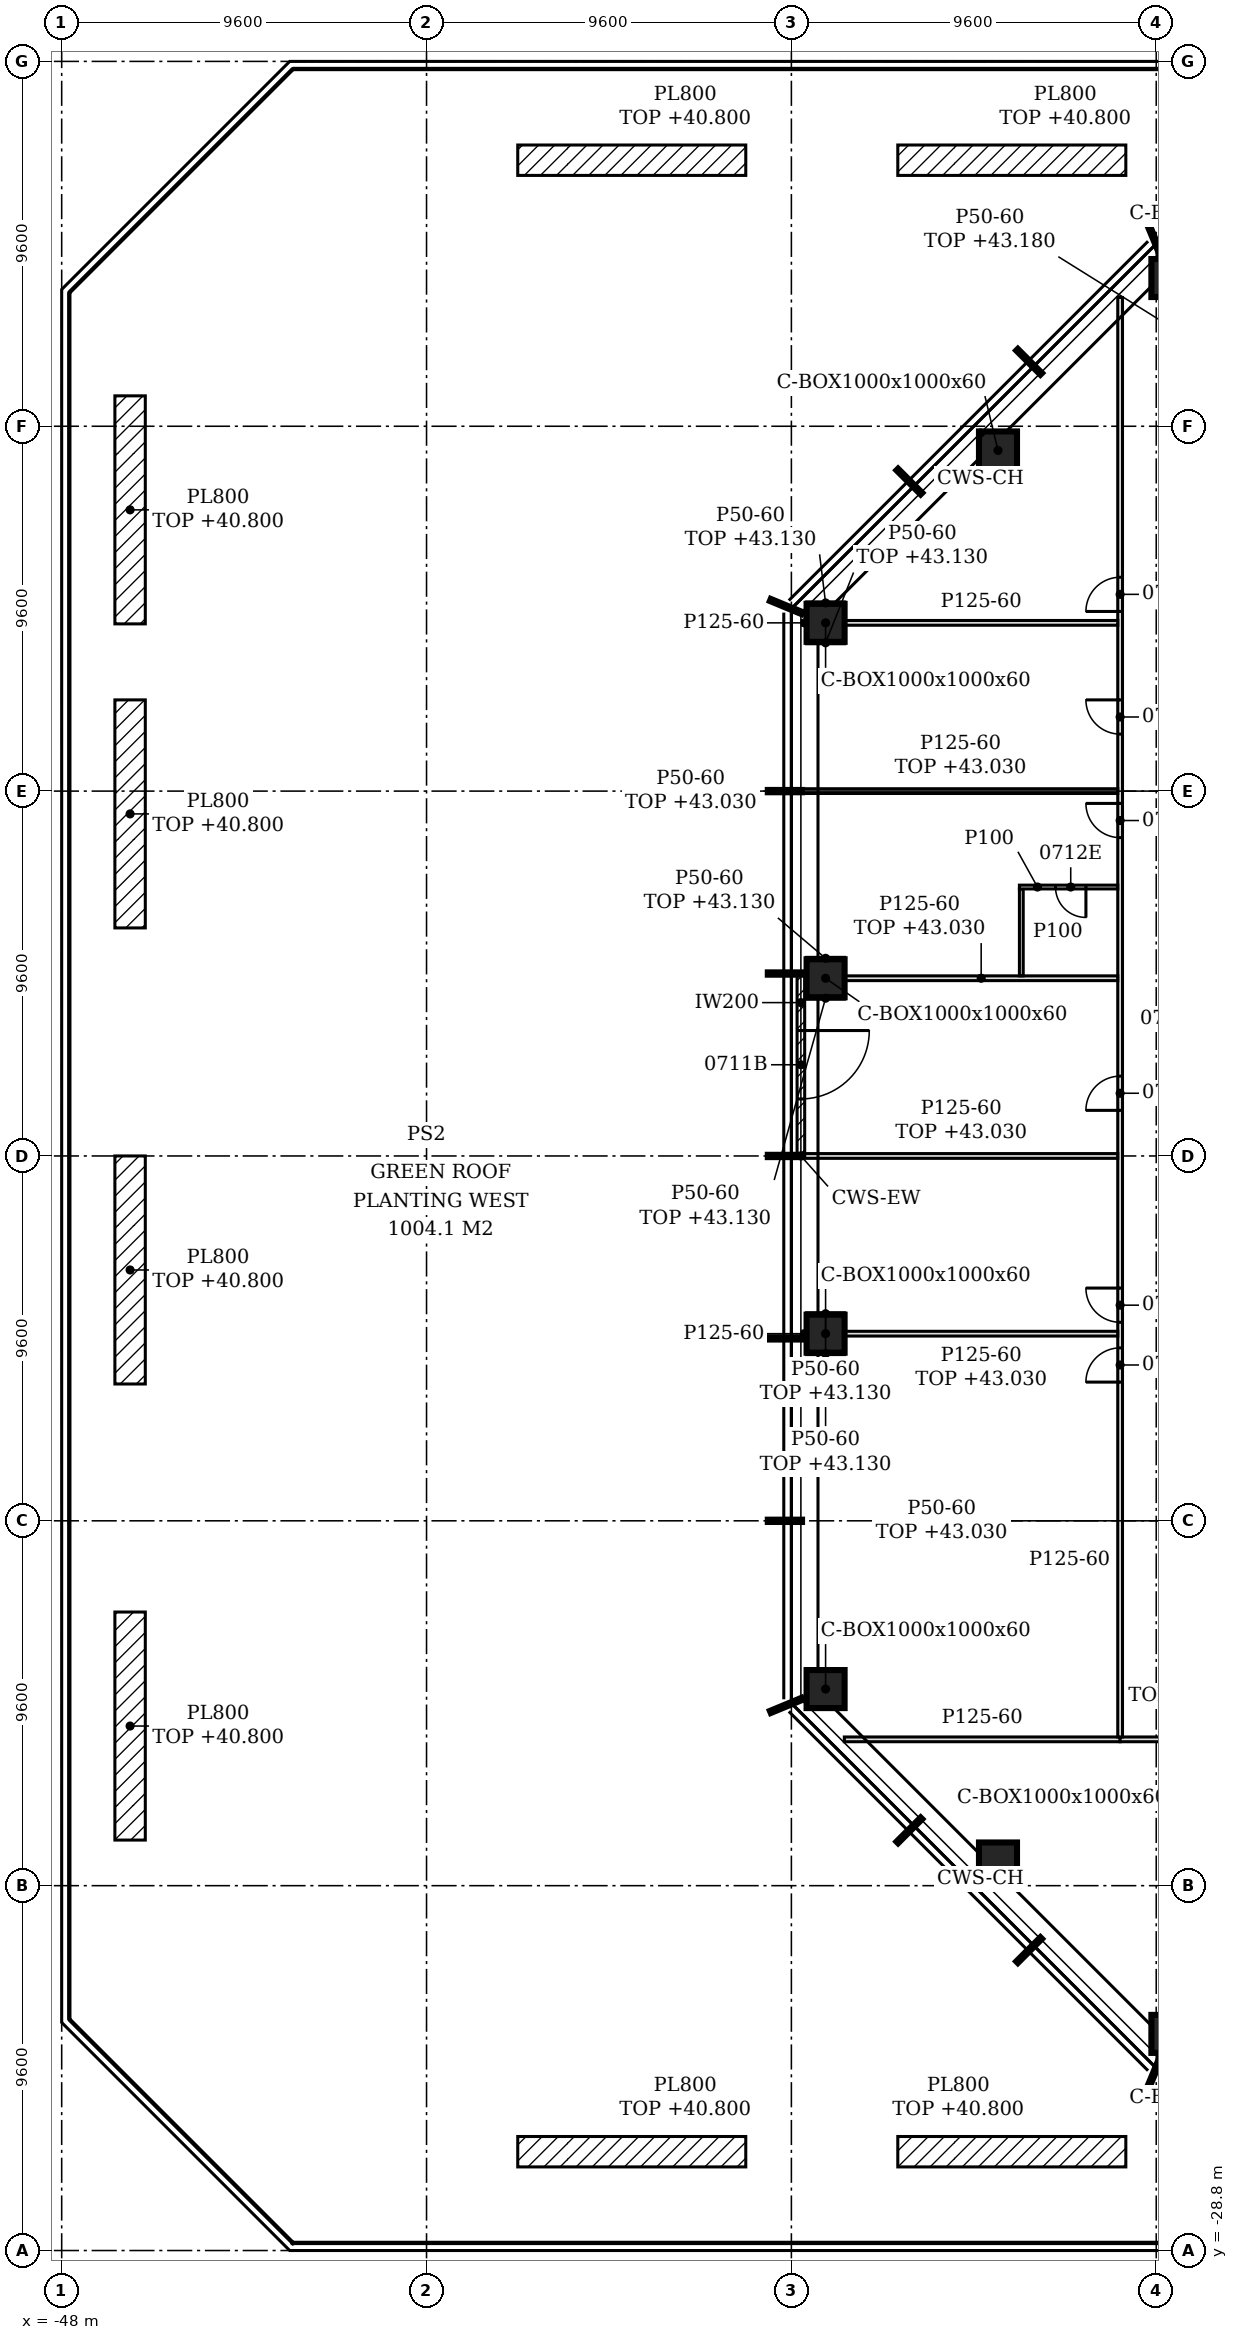
"""IFC4 building model, lengths in metres.
Left out: names, types, materials, properties, quantities, classifications, styles, units other than length and angle.
Written with IfcOpenShell. Run it as: python <this file> out.ifc"""

import sys

from ifc_helpers import new_model, si_unit, direction, frame, frame_2d, origin, origin_2d, place, context, subcontext, project, spatial, polyline, rectangle, hollow_rectangle, outline, extrude, element, fill, save


model = new_model("IFC4")
c1 = context("Model", 3, precision=1e-05, world=origin(), true_north=direction((0.0, 1.0)))
c2 = subcontext(c1, "Body", "Model", "MODEL_VIEW")
j1 = project(units=[si_unit("LENGTHUNIT", "METRE"), si_unit("PLANEANGLEUNIT", "RADIAN")], contexts=[c1])
p1 = place(None, origin())
s1 = spatial("IfcSite", under=j1, at=p1, CompositionType="ELEMENT")
p2 = place(p1, origin())
s2 = spatial("IfcBuilding", under=s1, at=p2, CompositionType="ELEMENT")
p3 = place(p2, frame((0.0, 0.0, 40.2)))
s3 = spatial("IfcBuildingStorey", under=s2, at=p3, CompositionType="ELEMENT", Elevation=40.2)
for number, where, z_axis, x_axis in (
    (1, (-18.827, -23.1, -0.15), (0.0, 0.0, 1.0), (1.0, 0.0, 0.0)),
    (2, (-18.827, 23.1, -0.15), (0.0, 0.0, 1.0), (1.0, 0.0, 0.0)),
    (3, (-23.364, 18.564, -0.15), (0.0, 0.0, 1.0), (1.0, 0.0, 0.0)),
    (4, (-27.9, 14.027, -0.15), (0.0, 0.0, 1.0), (1.0, 0.0, 0.0)),
    (5, (-27.9, 4.676, -0.15), (0.0, 0.0, 1.0), (1.0, 0.0, 0.0)),
    (6, (-27.9, -4.676, -0.15), (0.0, 0.0, 1.0), (1.0, 0.0, 0.0)),
    (7, (-27.9, -14.027, -0.15), (0.0, 0.0, 1.0), (1.0, 0.0, 0.0)),
    (8, (-23.364, -18.564, -0.15), (0.0, 0.0, 1.0), (1.0, 0.0, 0.0)),
):
    element("IfcColumn", number, at=place(p3, frame(where, z_axis=z_axis, x_axis=x_axis)), inside=s3, PredefinedType="COLUMN", context=c2, shape_type="SweptSolid", body=[
        extrude(hollow_rectangle(XDim=1.0, YDim=1.0, WallThickness=0.06, at=origin_2d()), origin(), (0.0, 0.0, 1.0), 3.6),
    ])
for number, where, z_axis, x_axis in (
    (9, (-36.0, 26.2, 0.0), (0.0, 0.0, 1.0), (1.0, 0.0, 0.0)),
    (10, (-36.0, -26.2, 0.0), (0.0, 0.0, 1.0), (1.0, 0.0, 0.0)),
    (11, (-26.0, 26.2, 0.0), (0.0, 0.0, 1.0), (1.0, 0.0, 0.0)),
    (12, (-26.0, -26.2, 0.0), (0.0, 0.0, 1.0), (1.0, 0.0, 0.0)),
    (13, (-46.2, -18.0, 0.0), (0.0, 0.0, 1.0), (0.0, 1.0, 0.0)),
    (14, (-46.2, -6.0, 0.0), (0.0, 0.0, 1.0), (0.0, 1.0, 0.0)),
    (15, (-46.2, 6.0, 0.0), (0.0, 0.0, 1.0), (0.0, 1.0, 0.0)),
    (16, (-46.2, 14.0, 0.0), (0.0, 0.0, 1.0), (0.0, 1.0, 0.0)),
):
    element("IfcWall", number, at=place(p3, frame(where, z_axis=z_axis, x_axis=x_axis)), inside=s3, PredefinedType="NOTDEFINED", context=c2, shape_type="SweptSolid", body=[
        extrude(rectangle(XDim=6.0, YDim=0.8, at=frame_2d((3.0, 0.0))), origin(), (0.0, 0.0, 1.0), 0.6),
    ])
p4 = place(p3, frame((-28.55, 4.77, 0.0), z_axis=(0.0, 0.0, 1.0), x_axis=(0.0, -1.0, 0.0)))
e17 = element("IfcWall", 17, at=p4, inside=s3, PredefinedType="NOTDEFINED", context=c2, shape_type="SweptSolid", body=[
    extrude(rectangle(XDim=4.74, YDim=0.2, at=frame_2d((2.37, 0.0))), origin(), (0.0, 0.0, 1.0), 3.45),
])
p5 = place(p4, frame((1.47, 0.0, 0.0)))
e18 = element("IfcOpeningElement", 18, at=p5, cuts=e17, PredefinedType="OPENING", context=c2, shape_type="SweptSolid", body=[
    extrude(rectangle(XDim=1.8, YDim=2.4, at=frame_2d((0.9, 1.2))), frame((0.0, 0.11, 0.0), z_axis=(0.0, -1.0, 0.0), x_axis=(1.0, 0.0, 0.0)), (0.0, 0.0, 1.0), 0.22),
])
p6 = place(p3, frame((-27.407, -15.35, 0.0), z_axis=(0.0, 0.0, 1.0), x_axis=(1.0, 0.0, 0.0)))
e19 = element("IfcWall", 19, at=p6, inside=s3, PredefinedType="PARTITIONING", context=c2, shape_type="SweptSolid", body=[
    extrude(outline(polyline([(0.0, 0.0), (7.257, 0.0), (7.257, 3.45), (1.104, 3.45), (1.102, 2.93), (0.555, 2.93), (0.553, 3.45), (0.0, 3.45), (0.0, 0.0)])), frame((0.0, 0.062, 0.0), z_axis=(0.0, -1.0, 0.0), x_axis=(1.0, 0.0, 0.0)), (0.0, 0.0, 1.0), 0.125),
])
p7 = place(p3, frame((-20.15, -15.35, 0.0), z_axis=(0.0, 0.0, 1.0), x_axis=(1.0, 0.0, 0.0)))
e20 = element("IfcWall", 20, at=p7, inside=s3, PredefinedType="PARTITIONING", context=c2, shape_type="SweptSolid", body=[
    extrude(outline(polyline([(0.0, 0.0), (39.287, 0.0), (39.288, 2.73), (39.2, 2.73), (39.198, 3.45), (27.5, 3.45), (27.498, 2.73), (27.2, 2.73), (27.198, 3.45), (15.5, 3.45), (15.498, 2.73), (15.2, 2.73), (15.198, 3.45), (5.9, 3.45), (5.898, 2.93), (5.6, 2.93), (5.598, 3.45), (0.0, 3.45), (0.0, 0.0)])), frame((0.0, 0.062, 0.0), z_axis=(0.0, -1.0, 0.0), x_axis=(1.0, 0.0, 0.0)), (0.0, 0.0, 1.0), 0.125),
])
p8 = place(p7, frame((4.55, 0.0, 0.0)))
e21 = element("IfcOpeningElement", 21, at=p8, cuts=e20, PredefinedType="OPENING", context=c2, shape_type="SweptSolid", body=[
    extrude(rectangle(XDim=0.9, YDim=2.1, at=frame_2d((0.45, 1.05))), frame((0.0, 0.073, 0.0), z_axis=(0.0, -1.0, 0.0), x_axis=(1.0, 0.0, 0.0)), (0.0, 0.0, 1.0), 0.145),
])
p9 = place(p7, frame((7.136, 0.0, 0.0)))
e22 = element("IfcOpeningElement", 22, at=p9, cuts=e20, PredefinedType="OPENING", context=c2, shape_type="SweptSolid", body=[
    extrude(rectangle(XDim=0.9, YDim=2.1, at=frame_2d((0.45, 1.05))), frame((0.0, 0.073, 0.0), z_axis=(0.0, -1.0, 0.0), x_axis=(1.0, 0.0, 0.0)), (0.0, 0.0, 1.0), 0.145),
])
p10 = place(p7, frame((14.15, 0.0, 0.0)))
e23 = element("IfcOpeningElement", 23, at=p10, cuts=e20, PredefinedType="OPENING", context=c2, shape_type="SweptSolid", body=[
    extrude(rectangle(XDim=0.9, YDim=2.1, at=frame_2d((0.45, 1.05))), frame((0.0, 0.073, 0.0), z_axis=(0.0, -1.0, 0.0), x_axis=(1.0, 0.0, 0.0)), (0.0, 0.0, 1.0), 0.145),
])
p11 = place(p7, frame((16.55, 0.0, 0.0)))
e24 = element("IfcOpeningElement", 24, at=p11, cuts=e20, PredefinedType="OPENING", context=c2, shape_type="SweptSolid", body=[
    extrude(rectangle(XDim=0.9, YDim=2.1, at=frame_2d((0.45, 1.05))), frame((0.0, 0.073, 0.0), z_axis=(0.0, -1.0, 0.0), x_axis=(1.0, 0.0, 0.0)), (0.0, 0.0, 1.0), 0.145),
])
p12 = place(p7, frame((21.35, 0.0, 0.0)))
e25 = element("IfcOpeningElement", 25, at=p12, cuts=e20, PredefinedType="OPENING", context=c2, shape_type="SweptSolid", body=[
    extrude(rectangle(XDim=0.9, YDim=2.1, at=frame_2d((0.45, 1.05))), frame((0.0, 0.073, 0.0), z_axis=(0.0, -1.0, 0.0), x_axis=(1.0, 0.0, 0.0)), (0.0, 0.0, 1.0), 0.145),
])
p13 = place(p7, frame((28.364, 0.0, 0.0)))
e26 = element("IfcOpeningElement", 26, at=p13, cuts=e20, PredefinedType="OPENING", context=c2, shape_type="SweptSolid", body=[
    extrude(rectangle(XDim=0.9, YDim=2.1, at=frame_2d((0.45, 1.05))), frame((0.0, 0.073, 0.0), z_axis=(0.0, -1.0, 0.0), x_axis=(1.0, 0.0, 0.0)), (0.0, 0.0, 1.0), 0.145),
])
p14 = place(p7, frame((32.35, 0.0, 0.0)))
e27 = element("IfcOpeningElement", 27, at=p14, cuts=e20, PredefinedType="OPENING", context=c2, shape_type="SweptSolid", body=[
    extrude(rectangle(XDim=0.9, YDim=2.1, at=frame_2d((0.45, 1.05))), frame((0.0, 0.073, 0.0), z_axis=(0.0, -1.0, 0.0), x_axis=(1.0, 0.0, 0.0)), (0.0, 0.0, 1.0), 0.145),
])
p15 = place(p7, frame((37.35, 0.0, 0.0)))
e28 = element("IfcOpeningElement", 28, at=p15, cuts=e20, PredefinedType="OPENING", context=c2, shape_type="SweptSolid", body=[
    extrude(rectangle(XDim=0.9, YDim=2.1, at=frame_2d((0.45, 1.05))), frame((0.0, 0.073, 0.0), z_axis=(0.0, -1.0, 0.0), x_axis=(1.0, 0.0, 0.0)), (0.0, 0.0, 1.0), 0.145),
])
p16 = place(p3, frame((-20.15, -15.288, 0.0), z_axis=(0.0, 0.0, 1.0), x_axis=(0.0, 1.0, 0.0)))
e29 = element("IfcWall", 29, at=p16, inside=s3, PredefinedType="PARTITIONING", context=c2, shape_type="SweptSolid", body=[
    extrude(outline(polyline([(0.0, 0.0), (37.876, 0.0), (37.876, 3.45), (37.622, 3.45), (37.62, 2.63), (36.507, 2.63), (36.505, 3.45), (34.583, 3.45), (34.581, 2.98), (34.393, 2.98), (34.39, 3.45), (29.798, 3.45), (29.795, 2.83), (29.577, 2.83), (29.575, 3.45), (24.998, 3.45), (24.996, 2.83), (24.778, 2.83), (24.775, 3.45), (20.198, 3.45), (20.196, 2.83), (19.978, 2.83), (19.976, 3.45), (15.397, 3.45), (15.396, 2.83), (15.177, 2.83), (15.176, 3.45), (10.597, 3.45), (10.595, 2.83), (10.377, 2.83), (10.375, 3.45), (5.798, 3.45), (5.795, 2.83), (5.577, 2.83), (5.575, 3.45), (0.998, 3.45), (0.996, 2.83), (0.778, 2.83), (0.775, 3.45), (0.0, 3.45), (0.0, 0.0)])), frame((0.0, 0.062, 0.0), z_axis=(0.0, -1.0, 0.0), x_axis=(1.0, 0.0, 0.0)), (0.0, 0.0, 1.0), 0.125),
])
p17 = place(p16, frame((9.337, 0.0, 0.0)))
e30 = element("IfcOpeningElement", 30, at=p17, cuts=e29, PredefinedType="OPENING", context=c2, shape_type="SweptSolid", body=[
    extrude(rectangle(XDim=0.9, YDim=2.1, at=frame_2d((0.45, 1.05))), frame((0.0, 0.073, 0.0), z_axis=(0.0, -1.0, 0.0), x_axis=(1.0, 0.0, 0.0)), (0.0, 0.0, 1.0), 0.145),
])
p18 = place(p16, frame((10.912, 0.0, 0.0)))
e31 = element("IfcOpeningElement", 31, at=p18, cuts=e29, PredefinedType="OPENING", context=c2, shape_type="SweptSolid", body=[
    extrude(rectangle(XDim=0.9, YDim=2.1, at=frame_2d((0.45, 1.05))), frame((0.0, 0.073, 0.0), z_axis=(0.0, -1.0, 0.0), x_axis=(1.0, 0.0, 0.0)), (0.0, 0.0, 1.0), 0.145),
])
p19 = place(p16, frame((16.488, 0.0, 0.0)))
e32 = element("IfcOpeningElement", 32, at=p19, cuts=e29, PredefinedType="OPENING", context=c2, shape_type="SweptSolid", body=[
    extrude(rectangle(XDim=0.9, YDim=2.1, at=frame_2d((0.45, 1.05))), frame((0.0, 0.073, 0.0), z_axis=(0.0, -1.0, 0.0), x_axis=(1.0, 0.0, 0.0)), (0.0, 0.0, 1.0), 0.145),
])
p20 = place(p16, frame((23.664, 0.0, 0.0)))
e33 = element("IfcOpeningElement", 33, at=p20, cuts=e29, PredefinedType="OPENING", context=c2, shape_type="SweptSolid", body=[
    extrude(rectangle(XDim=0.9, YDim=2.1, at=frame_2d((0.45, 1.05))), frame((0.0, 0.073, 0.0), z_axis=(0.0, -1.0, 0.0), x_axis=(1.0, 0.0, 0.0)), (0.0, 0.0, 1.0), 0.145),
])
p21 = place(p16, frame((26.387, 0.0, 0.0)))
e34 = element("IfcOpeningElement", 34, at=p21, cuts=e29, PredefinedType="OPENING", context=c2, shape_type="SweptSolid", body=[
    extrude(rectangle(XDim=0.9, YDim=2.1, at=frame_2d((0.45, 1.05))), frame((0.0, 0.073, 0.0), z_axis=(0.0, -1.0, 0.0), x_axis=(1.0, 0.0, 0.0)), (0.0, 0.0, 1.0), 0.145),
])
p22 = place(p16, frame((29.615, 0.0, 0.0)))
e35 = element("IfcOpeningElement", 35, at=p22, cuts=e29, PredefinedType="OPENING", context=c2, shape_type="SweptSolid", body=[
    extrude(rectangle(XDim=0.9, YDim=2.1, at=frame_2d((0.45, 1.05))), frame((0.0, 0.073, 0.0), z_axis=(0.0, -1.0, 0.0), x_axis=(1.0, 0.0, 0.0)), (0.0, 0.0, 1.0), 0.145),
])
p23 = place(p3, frame((-28.503, -4.676, 0.0), z_axis=(0.0, 0.0, 1.0), x_axis=(1.0, 0.0, 0.0)))
e36 = element("IfcWall", 36, at=p23, inside=s3, PredefinedType="PARTITIONING", context=c2, shape_type="SweptSolid", body=[
    extrude(rectangle(XDim=0.103, YDim=0.125, at=frame_2d((0.052, 0.0))), origin(), (0.0, 0.0, 1.0), 3.45),
])
p24 = place(p3, frame((-27.4, -4.676, 0.0), z_axis=(0.0, 0.0, 1.0), x_axis=(1.0, 0.0, 0.0)))
e37 = element("IfcWall", 37, at=p24, inside=s3, PredefinedType="PARTITIONING", context=c2, shape_type="SweptSolid", body=[
    extrude(rectangle(XDim=7.188, YDim=0.125, at=frame_2d((3.594, 0.0))), origin(), (0.0, 0.0, 1.0), 2.83),
])
p25 = place(p3, frame((-28.45, 0.0, 0.0), z_axis=(0.0, 0.0, 1.0), x_axis=(1.0, 0.0, 0.0)))
e38 = element("IfcWall", 38, at=p25, inside=s3, PredefinedType="PARTITIONING", context=c2, shape_type="SweptSolid", body=[
    extrude(rectangle(XDim=8.238, YDim=0.125, at=frame_2d((4.119, 0.0))), origin(), (0.0, 0.0, 1.0), 2.83),
])
p26 = place(p3, frame((-27.4, 4.676, 0.0), z_axis=(0.0, 0.0, 1.0), x_axis=(1.0, 0.0, 0.0)))
e39 = element("IfcWall", 39, at=p26, inside=s3, PredefinedType="PARTITIONING", context=c2, shape_type="SweptSolid", body=[
    extrude(rectangle(XDim=7.188, YDim=0.125, at=frame_2d((3.594, 0.0))), origin(), (0.0, 0.0, 1.0), 2.83),
])
p27 = place(p3, frame((-22.75, 4.739, 0.0), z_axis=(0.0, 0.0, 1.0), x_axis=(0.0, 1.0, 0.0)))
e40 = element("IfcWall", 40, at=p27, inside=s3, PredefinedType="PARTITIONING", context=c2, shape_type="SweptSolid", body=[
    extrude(outline(polyline([(0.0, 0.0), (2.287, 0.0), (2.288, 3.45), (0.171, 3.45), (0.169, 2.83), (0.0, 2.83), (0.0, 0.0)])), frame((0.0, 0.05, 0.0), z_axis=(0.0, -1.0, 0.0), x_axis=(1.0, 0.0, 0.0)), (0.0, 0.0, 1.0), 0.1),
])
p28 = place(p3, frame((-22.8, 7.076, 0.0), z_axis=(0.0, 0.0, 1.0), x_axis=(1.0, 0.0, 0.0)))
e41 = element("IfcWall", 41, at=p28, inside=s3, PredefinedType="PARTITIONING", context=c2, shape_type="SweptSolid", body=[
    extrude(rectangle(XDim=2.588, YDim=0.1, at=frame_2d((1.294, 0.0))), origin(), (0.0, 0.0, 1.0), 3.45),
])
p29 = place(p28, frame((0.95, 0.0, 0.0)))
e42 = element("IfcOpeningElement", 42, at=p29, cuts=e41, PredefinedType="OPENING", context=c2, shape_type="SweptSolid", body=[
    extrude(rectangle(XDim=0.8, YDim=2.1, at=frame_2d((0.4, 1.05))), frame((0.0, 0.06, 0.0), z_axis=(0.0, -1.0, 0.0), x_axis=(1.0, 0.0, 0.0)), (0.0, 0.0, 1.0), 0.12),
])
p30 = place(p3, frame((-28.49, 9.6, 0.0), z_axis=(0.0, 0.0, 1.0), x_axis=(1.0, 0.0, 0.0)))
e43 = element("IfcWall", 43, at=p30, inside=s3, PredefinedType="PARTITIONING", context=c2, shape_type="SweptSolid", body=[
    extrude(rectangle(XDim=8.278, YDim=0.125, at=frame_2d((4.139, 0.0))), origin(), (0.0, 0.0, 1.0), 2.83),
])
p31 = place(p3, frame((-28.503, 14.027, 0.0), z_axis=(0.0, 0.0, 1.0), x_axis=(1.0, 0.0, 0.0)))
e44 = element("IfcWall", 44, at=p31, inside=s3, PredefinedType="PARTITIONING", context=c2, shape_type="SweptSolid", body=[
    extrude(rectangle(XDim=0.103, YDim=0.125, at=frame_2d((0.052, 0.0))), origin(), (0.0, 0.0, 1.0), 3.45),
])
p32 = place(p3, frame((-27.4, 14.027, 0.0), z_axis=(0.0, 0.0, 1.0), x_axis=(1.0, 0.0, 0.0)))
e45 = element("IfcWall", 45, at=p32, inside=s3, PredefinedType="PARTITIONING", context=c2, shape_type="SweptSolid", body=[
    extrude(rectangle(XDim=7.188, YDim=0.125, at=frame_2d((3.594, 0.0))), origin(), (0.0, 0.0, 1.0), 3.45),
])
for number, where, z_axis, x_axis in (
    (46, (-28.4, -4.151, 0.0), (0.0, 0.0, 1.0), (1.0, 0.0, 0.0)),
    (47, (-28.4, -5.201, 0.0), (0.0, 0.0, 1.0), (1.0, 0.0, 0.0)),
    (48, (-28.4, 5.201, 0.0), (0.0, 0.0, 1.0), (1.0, 0.0, 0.0)),
    (49, (-28.4, 4.151, 0.0), (0.0, 0.0, 1.0), (1.0, 0.0, 0.0)),
    (50, (-28.4, 14.552, 0.0), (0.0, 0.0, 1.0), (1.0, 0.0, 0.0)),
    (51, (-28.4, 13.502, 0.0), (0.0, 0.0, 1.0), (1.0, 0.0, 0.0)),
):
    element("IfcWall", number, at=place(p3, frame(where, z_axis=z_axis, x_axis=x_axis)), inside=s3, PredefinedType="PARTITIONING", context=c2, shape_type="SweptSolid", body=[
        extrude(rectangle(XDim=1.0, YDim=0.05, at=frame_2d((0.5, 0.0))), origin(), (0.0, 0.0, 1.0), 2.93),
    ])
p33 = place(p5, origin())
e52 = element("IfcDoor", 52, at=p33, inside=s3, OperationType="SINGLE_SWING_LEFT", PredefinedType="DOOR", context=c2, shape_type="SweptSolid", body=[
    extrude(rectangle(XDim=1.8, YDim=2.4, at=frame_2d((0.9, 1.2))), frame((0.0, 0.025, 0.0), z_axis=(0.0, -1.0, 0.0), x_axis=(1.0, 0.0, 0.0)), (0.0, 0.0, 1.0), 0.05),
])
fill(e18, e52)
p34 = place(p17, origin())
e53 = element("IfcDoor", 53, at=p34, inside=s3, OperationType="SINGLE_SWING_LEFT", PredefinedType="DOOR", context=c2, shape_type="SweptSolid", body=[
    extrude(rectangle(XDim=0.9, YDim=2.1, at=frame_2d((0.45, 1.05))), frame((0.0, 0.025, 0.0), z_axis=(0.0, -1.0, 0.0), x_axis=(1.0, 0.0, 0.0)), (0.0, 0.0, 1.0), 0.05),
])
fill(e30, e53)
p35 = place(p18, origin())
e54 = element("IfcDoor", 54, at=p35, inside=s3, OperationType="SINGLE_SWING_RIGHT", PredefinedType="DOOR", context=c2, shape_type="SweptSolid", body=[
    extrude(rectangle(XDim=0.9, YDim=2.1, at=frame_2d((0.45, 1.05))), frame((0.0, 0.025, 0.0), z_axis=(0.0, -1.0, 0.0), x_axis=(1.0, 0.0, 0.0)), (0.0, 0.0, 1.0), 0.05),
])
fill(e31, e54)
p36 = place(p19, origin())
e55 = element("IfcDoor", 55, at=p36, inside=s3, OperationType="SINGLE_SWING_LEFT", PredefinedType="DOOR", context=c2, shape_type="SweptSolid", body=[
    extrude(rectangle(XDim=0.9, YDim=2.1, at=frame_2d((0.45, 1.05))), frame((0.0, 0.025, 0.0), z_axis=(0.0, -1.0, 0.0), x_axis=(1.0, 0.0, 0.0)), (0.0, 0.0, 1.0), 0.05),
])
fill(e32, e55)
p37 = place(p20, origin())
e56 = element("IfcDoor", 56, at=p37, inside=s3, OperationType="SINGLE_SWING_RIGHT", PredefinedType="DOOR", context=c2, shape_type="SweptSolid", body=[
    extrude(rectangle(XDim=0.9, YDim=2.1, at=frame_2d((0.45, 1.05))), frame((0.0, 0.025, 0.0), z_axis=(0.0, -1.0, 0.0), x_axis=(1.0, 0.0, 0.0)), (0.0, 0.0, 1.0), 0.05),
])
fill(e33, e56)
p38 = place(p29, frame((0.8, 0.0, 0.0), z_axis=(0.0, 0.0, 1.0), x_axis=(-1.0, 0.0, 0.0)))
e57 = element("IfcDoor", 57, at=p38, inside=s3, OperationType="SINGLE_SWING_LEFT", PredefinedType="DOOR", context=c2, shape_type="SweptSolid", body=[
    extrude(rectangle(XDim=0.8, YDim=2.1, at=frame_2d((0.4, 1.05))), frame((0.0, 0.025, 0.0), z_axis=(0.0, -1.0, 0.0), x_axis=(1.0, 0.0, 0.0)), (0.0, 0.0, 1.0), 0.05),
])
fill(e42, e57)
p39 = place(p21, origin())
e58 = element("IfcDoor", 58, at=p39, inside=s3, OperationType="SINGLE_SWING_RIGHT", PredefinedType="DOOR", context=c2, shape_type="SweptSolid", body=[
    extrude(rectangle(XDim=0.9, YDim=2.1, at=frame_2d((0.45, 1.05))), frame((0.0, 0.025, 0.0), z_axis=(0.0, -1.0, 0.0), x_axis=(1.0, 0.0, 0.0)), (0.0, 0.0, 1.0), 0.05),
])
fill(e34, e58)
p40 = place(p22, origin())
e59 = element("IfcDoor", 59, at=p40, inside=s3, OperationType="SINGLE_SWING_LEFT", PredefinedType="DOOR", context=c2, shape_type="SweptSolid", body=[
    extrude(rectangle(XDim=0.9, YDim=2.1, at=frame_2d((0.45, 1.05))), frame((0.0, 0.025, 0.0), z_axis=(0.0, -1.0, 0.0), x_axis=(1.0, 0.0, 0.0)), (0.0, 0.0, 1.0), 0.05),
])
fill(e35, e59)
save(model, sys.argv[1])
